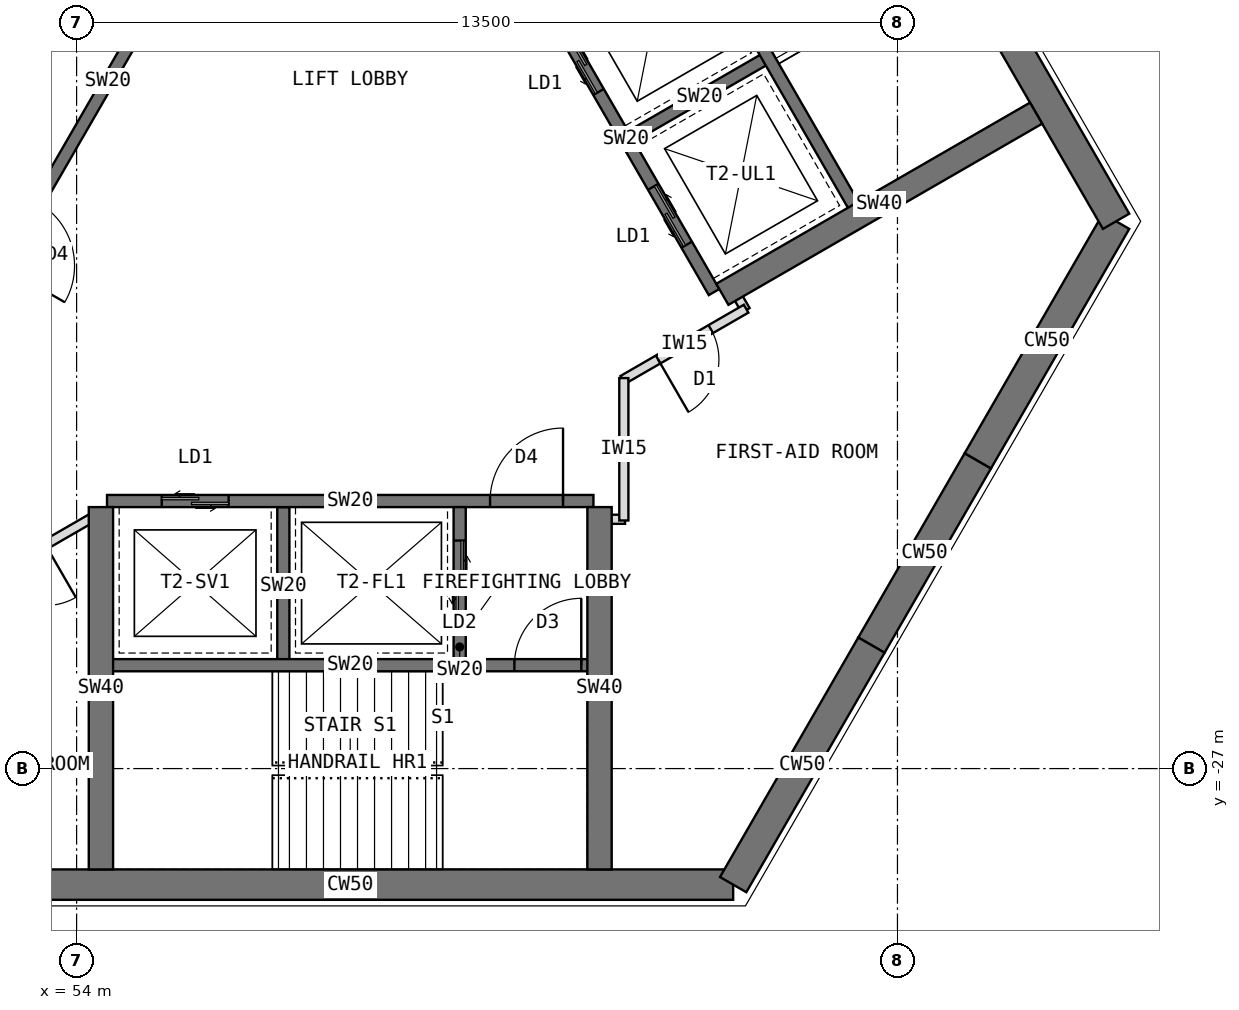
"""IFC4 building model, lengths in metres.
Left out: names, types, materials, properties, quantities, classifications, styles, units other than length and angle.
Written with IfcOpenShell. Run it as: python <this file> out.ifc"""

import sys

from ifc_helpers import new_model, si_unit, direction, frame, frame_2d, origin, place, context, subcontext, project, spatial, rectangle, extrude, element, fill, save


model = new_model("IFC4")
c1 = context("Model", 3, precision=1e-05, world=origin(), true_north=direction((0.0, 1.0)))
c2 = subcontext(c1, "Body", "Model", "MODEL_VIEW")
j1 = project(units=[si_unit("LENGTHUNIT", "METRE"), si_unit("PLANEANGLEUNIT", "RADIAN")], contexts=[c1])
p1 = place(None, origin())
s1 = spatial("IfcSite", under=j1, at=p1, CompositionType="ELEMENT")
p2 = place(p1, origin())
s2 = spatial("IfcBuilding", under=s1, at=p2, CompositionType="ELEMENT")
p3 = place(p2, frame((0.0, 0.0, 206.5)))
s3 = spatial("IfcBuildingStorey", under=s2, at=p3, CompositionType="ELEMENT", Elevation=206.5)
p4 = place(p3, frame((52.202, -28.908, 0.0), z_axis=(0.0, 0.0, 1.0), x_axis=(1.0, 0.0, 0.0)))
e1 = element("IfcWall", 1, at=p4, inside=s3, PredefinedType="SHEAR", context=c2, shape_type="SweptSolid", body=[
    extrude(rectangle(XDim=12.596, YDim=0.5, at=frame_2d((6.298, 0.0))), origin(), (0.0, 0.0, 1.0), 4.0),
])
p5 = place(p3, frame((64.798, -28.908, 0.0), z_axis=(0.0, 0.0, 1.0), x_axis=(0.499984222037, 0.866034513004, 0.0)))
e2 = element("IfcWall", 2, at=p5, inside=s3, PredefinedType="SHEAR", context=c2, shape_type="SweptSolid", body=[
    extrude(rectangle(XDim=4.548, YDim=0.5, at=frame_2d((2.274, 0.0))), origin(), (0.0, 0.0, 1.0), 4.0),
])
p6 = place(p3, frame((67.072, -24.97, 0.0), z_axis=(0.0, 0.0, 1.0), x_axis=(0.500010275428, 0.866019471182, 0.0)))
e3 = element("IfcWall", 3, at=p6, inside=s3, PredefinedType="SHEAR", context=c2, shape_type="SweptSolid", body=[
    extrude(rectangle(XDim=3.5, YDim=0.5, at=frame_2d((1.75, 0.0))), origin(), (0.0, 0.0, 1.0), 4.0),
])
p7 = place(p3, frame((68.822, -21.939, 0.0), z_axis=(0.0, 0.0, 1.0), x_axis=(0.500024481964, 0.866011268655, 0.0)))
e4 = element("IfcWall", 4, at=p7, inside=s3, PredefinedType="SHEAR", context=c2, shape_type="SweptSolid", body=[
    extrude(rectangle(XDim=4.548, YDim=0.5, at=frame_2d((2.274, 0.0))), origin(), (0.0, 0.0, 1.0), 4.0),
])
p8 = place(p3, frame((71.096, -18.0, 0.0), z_axis=(0.0, 0.0, 1.0), x_axis=(-0.500005998175, 0.866021940709, 0.0)))
e5 = element("IfcWall", 5, at=p8, inside=s3, PredefinedType="SHEAR", context=c2, shape_type="SweptSolid", body=[
    extrude(rectangle(XDim=12.596, YDim=0.5, at=frame_2d((6.298, 0.0))), origin(), (0.0, 0.0, 1.0), 4.0),
])
p9 = place(p3, frame((56.516, -12.236, 0.0), z_axis=(0.0, 0.0, 1.0), x_axis=(-0.49999894854, -0.866026010844, 0.0)))
e6 = element("IfcWall", 6, at=p9, inside=s3, PredefinedType="SHEAR", context=c2, shape_type="SweptSolid", body=[
    extrude(rectangle(XDim=8.0, YDim=0.2, at=frame_2d((4.0, 0.0))), origin(), (0.0, 0.0, 1.0), 4.0),
])
p10 = place(p9, frame((6.3, 0.0, 0.0)))
e7 = element("IfcOpeningElement", 7, at=p10, cuts=e6, PredefinedType="OPENING", context=c2, shape_type="SweptSolid", body=[
    extrude(rectangle(XDim=1.2, YDim=2.1, at=frame_2d((0.6, 1.05))), frame((0.0, 0.11, 0.0), z_axis=(0.0, -1.0, 0.0), x_axis=(1.0, 0.0, 0.0)), (0.0, 0.0, 1.0), 0.22),
])
p11 = place(p3, frame((54.178, -10.886, 0.0), z_axis=(0.0, 0.0, 1.0), x_axis=(-0.49999894854, -0.866026010844, 0.0)))
e8 = element("IfcWall", 8, at=p11, inside=s3, PredefinedType="SHEAR", context=c2, shape_type="SweptSolid", body=[
    extrude(rectangle(XDim=8.0, YDim=0.2, at=frame_2d((4.0, 0.0))), origin(), (0.0, 0.0, 1.0), 4.0),
])
p12 = place(p11, frame((6.8, 0.0, 0.0)))
e9 = element("IfcOpeningElement", 9, at=p12, cuts=e8, PredefinedType="OPENING", context=c2, shape_type="SweptSolid", body=[
    extrude(rectangle(XDim=0.9, YDim=2.1, at=frame_2d((0.45, 1.05))), frame((0.0, 0.11, 0.0), z_axis=(0.0, -1.0, 0.0), x_axis=(1.0, 0.0, 0.0)), (0.0, 0.0, 1.0), 0.22),
])
p13 = place(p3, frame((54.5, -22.6, 0.0), z_axis=(0.0, 0.0, 1.0), x_axis=(1.0, 0.0, 0.0)))
e10 = element("IfcWall", 10, at=p13, inside=s3, PredefinedType="SHEAR", context=c2, shape_type="SweptSolid", body=[
    extrude(rectangle(XDim=8.0, YDim=0.2, at=frame_2d((4.0, 0.0))), origin(), (0.0, 0.0, 1.0), 4.0),
])
p14 = place(p13, frame((6.3, 0.0, 0.0)))
e11 = element("IfcOpeningElement", 11, at=p14, cuts=e10, PredefinedType="OPENING", context=c2, shape_type="SweptSolid", body=[
    extrude(rectangle(XDim=1.2, YDim=2.1, at=frame_2d((0.6, 1.05))), frame((0.0, 0.11, 0.0), z_axis=(0.0, -1.0, 0.0), x_axis=(1.0, 0.0, 0.0)), (0.0, 0.0, 1.0), 0.22),
])
p15 = place(p13, frame((0.9, 0.0, 0.0)))
e12 = element("IfcOpeningElement", 12, at=p15, cuts=e10, PredefinedType="OPENING", context=c2, shape_type="SweptSolid", body=[
    extrude(rectangle(XDim=1.1, YDim=2.2, at=frame_2d((0.55, 1.1))), frame((0.0, 0.11, 0.0), z_axis=(0.0, -1.0, 0.0), x_axis=(1.0, 0.0, 0.0)), (0.0, 0.0, 1.0), 0.22),
])
p16 = place(p3, frame((57.4, -22.7, 0.0), z_axis=(0.0, 0.0, 1.0), x_axis=(0.0, -1.0, 0.0)))
e13 = element("IfcWall", 13, at=p16, inside=s3, PredefinedType="SHEAR", context=c2, shape_type="SweptSolid", body=[
    extrude(rectangle(XDim=2.6, YDim=0.2, at=frame_2d((1.3, 0.0))), origin(), (0.0, 0.0, 1.0), 4.0),
])
p17 = place(p3, frame((60.3, -22.7, 0.0), z_axis=(0.0, 0.0, 1.0), x_axis=(0.0, -1.0, 0.0)))
e14 = element("IfcWall", 14, at=p17, inside=s3, PredefinedType="SHEAR", context=c2, shape_type="SweptSolid", body=[
    extrude(rectangle(XDim=2.6, YDim=0.2, at=frame_2d((1.3, 0.0))), origin(), (0.0, 0.0, 1.0), 4.0),
])
p18 = place(p17, frame((0.55, 0.0, 0.0)))
e15 = element("IfcOpeningElement", 15, at=p18, cuts=e14, PredefinedType="OPENING", context=c2, shape_type="SweptSolid", body=[
    extrude(rectangle(XDim=1.3, YDim=2.2, at=frame_2d((0.65, 1.1))), frame((0.0, 0.11, 0.0), z_axis=(0.0, -1.0, 0.0), x_axis=(1.0, 0.0, 0.0)), (0.0, 0.0, 1.0), 0.22),
])
p19 = place(p3, frame((54.5, -25.3, 0.0), z_axis=(0.0, 0.0, 1.0), x_axis=(1.0, 0.0, 0.0)))
e16 = element("IfcWall", 16, at=p19, inside=s3, PredefinedType="SHEAR", context=c2, shape_type="SweptSolid", body=[
    extrude(rectangle(XDim=8.0, YDim=0.2, at=frame_2d((4.0, 0.0))), origin(), (0.0, 0.0, 1.0), 4.0),
])
p20 = place(p19, frame((6.7, 0.0, 0.0)))
e17 = element("IfcOpeningElement", 17, at=p20, cuts=e16, PredefinedType="OPENING", context=c2, shape_type="SweptSolid", body=[
    extrude(rectangle(XDim=1.1, YDim=2.1, at=frame_2d((0.55, 1.05))), frame((0.0, 0.11, 0.0), z_axis=(0.0, -1.0, 0.0), x_axis=(1.0, 0.0, 0.0)), (0.0, 0.0, 1.0), 0.22),
])
for number, where, z_axis, x_axis in (
    (18, (62.6, -22.7, 0.0), (0.0, 0.0, 1.0), (0.0, -1.0, 0.0)),
    (19, (54.4, -22.7, 0.0), (0.0, 0.0, 1.0), (0.0, -1.0, 0.0)),
):
    element("IfcWall", number, at=place(p3, frame(where, z_axis=z_axis, x_axis=x_axis)), inside=s3, PredefinedType="SHEAR", context=c2, shape_type="SweptSolid", body=[
        extrude(rectangle(XDim=5.958, YDim=0.4, at=frame_2d((2.979, 0.0))), origin(), (0.0, 0.0, 1.0), 4.0),
    ])
p21 = place(p3, frame((64.484, -19.164, 0.0), z_axis=(0.0, 0.0, 1.0), x_axis=(-0.49999894854, 0.866026010844, 0.0)))
e20 = element("IfcWall", 20, at=p21, inside=s3, PredefinedType="SHEAR", context=c2, shape_type="SweptSolid", body=[
    extrude(rectangle(XDim=8.0, YDim=0.2, at=frame_2d((4.0, 0.0))), origin(), (0.0, 0.0, 1.0), 4.0),
])
p22 = place(p21, frame((6.3, 0.0, 0.0)))
e21 = element("IfcOpeningElement", 21, at=p22, cuts=e20, PredefinedType="OPENING", context=c2, shape_type="SweptSolid", body=[
    extrude(rectangle(XDim=1.2, YDim=2.1, at=frame_2d((0.6, 1.05))), frame((0.0, 0.11, 0.0), z_axis=(0.0, -1.0, 0.0), x_axis=(1.0, 0.0, 0.0)), (0.0, 0.0, 1.0), 0.22),
])
p23 = place(p21, frame((0.9, 0.0, 0.0)))
e22 = element("IfcOpeningElement", 22, at=p23, cuts=e20, PredefinedType="OPENING", context=c2, shape_type="SweptSolid", body=[
    extrude(rectangle(XDim=1.1, YDim=2.2, at=frame_2d((0.55, 1.1))), frame((0.0, 0.11, 0.0), z_axis=(0.0, -1.0, 0.0), x_axis=(1.0, 0.0, 0.0)), (0.0, 0.0, 1.0), 0.22),
])
p24 = place(p21, frame((3.8, 0.0, 0.0)))
e23 = element("IfcOpeningElement", 23, at=p24, cuts=e20, PredefinedType="OPENING", context=c2, shape_type="SweptSolid", body=[
    extrude(rectangle(XDim=1.1, YDim=2.2, at=frame_2d((0.55, 1.1))), frame((0.0, 0.11, 0.0), z_axis=(0.0, -1.0, 0.0), x_axis=(1.0, 0.0, 0.0)), (0.0, 0.0, 1.0), 0.22),
])
p25 = place(p3, frame((63.12, -16.603, 0.0), z_axis=(0.0, 0.0, 1.0), x_axis=(0.866062058628, 0.499936506574, 0.0)))
e24 = element("IfcWall", 24, at=p25, inside=s3, PredefinedType="SHEAR", context=c2, shape_type="SweptSolid", body=[
    extrude(rectangle(XDim=2.6, YDim=0.2, at=frame_2d((1.3, 0.0))), origin(), (0.0, 0.0, 1.0), 4.0),
])
p26 = place(p3, frame((66.822, -17.814, 0.0), z_axis=(0.0, 0.0, 1.0), x_axis=(-0.49999894854, 0.866026010844, 0.0)))
e25 = element("IfcWall", 25, at=p26, inside=s3, PredefinedType="SHEAR", context=c2, shape_type="SweptSolid", body=[
    extrude(rectangle(XDim=8.0, YDim=0.2, at=frame_2d((4.0, 0.0))), origin(), (0.0, 0.0, 1.0), 4.0),
])
p27 = place(p26, frame((6.7, 0.0, 0.0)))
e26 = element("IfcOpeningElement", 26, at=p27, cuts=e25, PredefinedType="OPENING", context=c2, shape_type="SweptSolid", body=[
    extrude(rectangle(XDim=1.1, YDim=2.1, at=frame_2d((0.55, 1.05))), frame((0.0, 0.11, 0.0), z_axis=(0.0, -1.0, 0.0), x_axis=(1.0, 0.0, 0.0)), (0.0, 0.0, 1.0), 0.22),
])
p28 = place(p3, frame((64.62, -19.201, 0.0), z_axis=(0.0, 0.0, 1.0), x_axis=(0.866012946976, 0.500021575205, 0.0)))
e27 = element("IfcWall", 27, at=p28, inside=s3, PredefinedType="SHEAR", context=c2, shape_type="SweptSolid", body=[
    extrude(rectangle(XDim=5.958, YDim=0.4, at=frame_2d((2.979, 0.0))), origin(), (0.0, 0.0, 1.0), 4.0),
])
p29 = place(p3, frame((63.02, -22.9, 0.0), z_axis=(0.0, 0.0, 1.0), x_axis=(-1.0, 0.0, 0.0)))
e28 = element("IfcWall", 28, at=p29, inside=s3, PredefinedType="PARTITIONING", context=c2, shape_type="SweptSolid", body=[
    extrude(rectangle(XDim=0.43, YDim=0.15, at=frame_2d((0.215, 0.0))), origin(), (0.0, 0.0, 1.0), 3.8),
])
p30 = place(p3, frame((54.23, -22.89, 0.0), z_axis=(0.0, 0.0, 1.0), x_axis=(-0.866006805923, -0.500032211057, 0.0)))
e29 = element("IfcWall", 29, at=p30, inside=s3, PredefinedType="PARTITIONING", context=c2, shape_type="SweptSolid", body=[
    extrude(rectangle(XDim=4.526, YDim=0.15, at=frame_2d((2.263, 0.0))), origin(), (0.0, 0.0, 1.0), 3.8),
])
p31 = place(p30, frame((0.858, 0.0, 0.0)))
e30 = element("IfcOpeningElement", 30, at=p31, cuts=e29, PredefinedType="OPENING", context=c2, shape_type="SweptSolid", body=[
    extrude(rectangle(XDim=1.0, YDim=2.1, at=frame_2d((0.5, 1.05))), frame((0.0, 0.085, 0.0), z_axis=(0.0, -1.0, 0.0), x_axis=(1.0, 0.0, 0.0)), (0.0, 0.0, 1.0), 0.17),
])
p32 = place(p3, frame((64.789, -19.092, 0.0), z_axis=(0.0, 0.0, 1.0), x_axis=(0.499804398801, -0.866138304741, 0.0)))
e31 = element("IfcWall", 31, at=p32, inside=s3, PredefinedType="PARTITIONING", context=c2, shape_type="SweptSolid", body=[
    extrude(rectangle(XDim=0.43, YDim=0.15, at=frame_2d((0.215, 0.0))), origin(), (0.0, 0.0, 1.0), 3.8),
])
p33 = place(p3, frame((65.011, -19.437, 0.0), z_axis=(0.0, 0.0, 1.0), x_axis=(-0.865982457891, -0.500074377092, 0.0)))
e32 = element("IfcWall", 32, at=p33, inside=s3, PredefinedType="PARTITIONING", context=c2, shape_type="SweptSolid", body=[
    extrude(rectangle(XDim=2.342, YDim=0.15, at=frame_2d((1.171, 0.0))), origin(), (0.0, 0.0, 1.0), 3.8),
])
p34 = place(p33, frame((0.671, 0.0, 0.0)))
e33 = element("IfcOpeningElement", 33, at=p34, cuts=e32, PredefinedType="OPENING", context=c2, shape_type="SweptSolid", body=[
    extrude(rectangle(XDim=1.0, YDim=2.1, at=frame_2d((0.5, 1.05))), frame((0.0, 0.085, 0.0), z_axis=(0.0, -1.0, 0.0), x_axis=(1.0, 0.0, 0.0)), (0.0, 0.0, 1.0), 0.17),
])
p35 = place(p3, frame((63.0, -20.578, 0.0), z_axis=(0.0, 0.0, 1.0), x_axis=(0.0, -1.0, 0.0)))
e34 = element("IfcWall", 34, at=p35, inside=s3, PredefinedType="PARTITIONING", context=c2, shape_type="SweptSolid", body=[
    extrude(rectangle(XDim=2.342, YDim=0.15, at=frame_2d((1.171, 0.0))), origin(), (0.0, 0.0, 1.0), 3.8),
])
p36 = place(p14, origin())
e35 = element("IfcDoor", 35, at=p36, inside=s3, OperationType="SINGLE_SWING_RIGHT", PredefinedType="DOOR", context=c2, shape_type="SweptSolid", body=[
    extrude(rectangle(XDim=1.2, YDim=2.1, at=frame_2d((0.6, 1.05))), frame((0.0, 0.025, 0.0), z_axis=(0.0, -1.0, 0.0), x_axis=(1.0, 0.0, 0.0)), (0.0, 0.0, 1.0), 0.05),
])
fill(e11, e35)
p37 = place(p18, origin())
e36 = element("IfcDoor", 36, at=p37, inside=s3, OperationType="DOUBLE_DOOR_SLIDING", PredefinedType="DOOR", context=c2, shape_type="SweptSolid", body=[
    extrude(rectangle(XDim=1.3, YDim=2.2, at=frame_2d((0.65, 1.1))), frame((0.0, 0.025, 0.0), z_axis=(0.0, -1.0, 0.0), x_axis=(1.0, 0.0, 0.0)), (0.0, 0.0, 1.0), 0.05),
])
fill(e15, e36)
p38 = place(p15, origin())
e37 = element("IfcDoor", 37, at=p38, inside=s3, OperationType="DOUBLE_DOOR_SLIDING", PredefinedType="DOOR", context=c2, shape_type="SweptSolid", body=[
    extrude(rectangle(XDim=1.1, YDim=2.2, at=frame_2d((0.55, 1.1))), frame((0.0, 0.025, 0.0), z_axis=(0.0, -1.0, 0.0), x_axis=(1.0, 0.0, 0.0)), (0.0, 0.0, 1.0), 0.05),
])
fill(e12, e37)
p39 = place(p20, origin())
e38 = element("IfcDoor", 38, at=p39, inside=s3, OperationType="SINGLE_SWING_RIGHT", PredefinedType="DOOR", context=c2, shape_type="SweptSolid", body=[
    extrude(rectangle(XDim=1.1, YDim=2.1, at=frame_2d((0.55, 1.05))), frame((0.0, 0.025, 0.0), z_axis=(0.0, -1.0, 0.0), x_axis=(1.0, 0.0, 0.0)), (0.0, 0.0, 1.0), 0.05),
])
fill(e17, e38)
p40 = place(p23, origin())
e39 = element("IfcDoor", 39, at=p40, inside=s3, OperationType="DOUBLE_DOOR_SLIDING", PredefinedType="DOOR", context=c2, shape_type="SweptSolid", body=[
    extrude(rectangle(XDim=1.1, YDim=2.2, at=frame_2d((0.55, 1.1))), frame((0.0, 0.025, 0.0), z_axis=(0.0, -1.0, 0.0), x_axis=(1.0, 0.0, 0.0)), (0.0, 0.0, 1.0), 0.05),
])
fill(e22, e39)
p41 = place(p24, origin())
e40 = element("IfcDoor", 40, at=p41, inside=s3, OperationType="DOUBLE_DOOR_SLIDING", PredefinedType="DOOR", context=c2, shape_type="SweptSolid", body=[
    extrude(rectangle(XDim=1.1, YDim=2.2, at=frame_2d((0.55, 1.1))), frame((0.0, 0.025, 0.0), z_axis=(0.0, -1.0, 0.0), x_axis=(1.0, 0.0, 0.0)), (0.0, 0.0, 1.0), 0.05),
])
fill(e23, e40)
p42 = place(p34, origin())
e41 = element("IfcDoor", 41, at=p42, inside=s3, OperationType="SINGLE_SWING_RIGHT", PredefinedType="DOOR", context=c2, shape_type="SweptSolid", body=[
    extrude(rectangle(XDim=1.0, YDim=2.1, at=frame_2d((0.5, 1.05))), frame((0.0, 0.025, 0.0), z_axis=(0.0, -1.0, 0.0), x_axis=(1.0, 0.0, 0.0)), (0.0, 0.0, 1.0), 0.05),
])
fill(e33, e41)
save(model, sys.argv[1])
